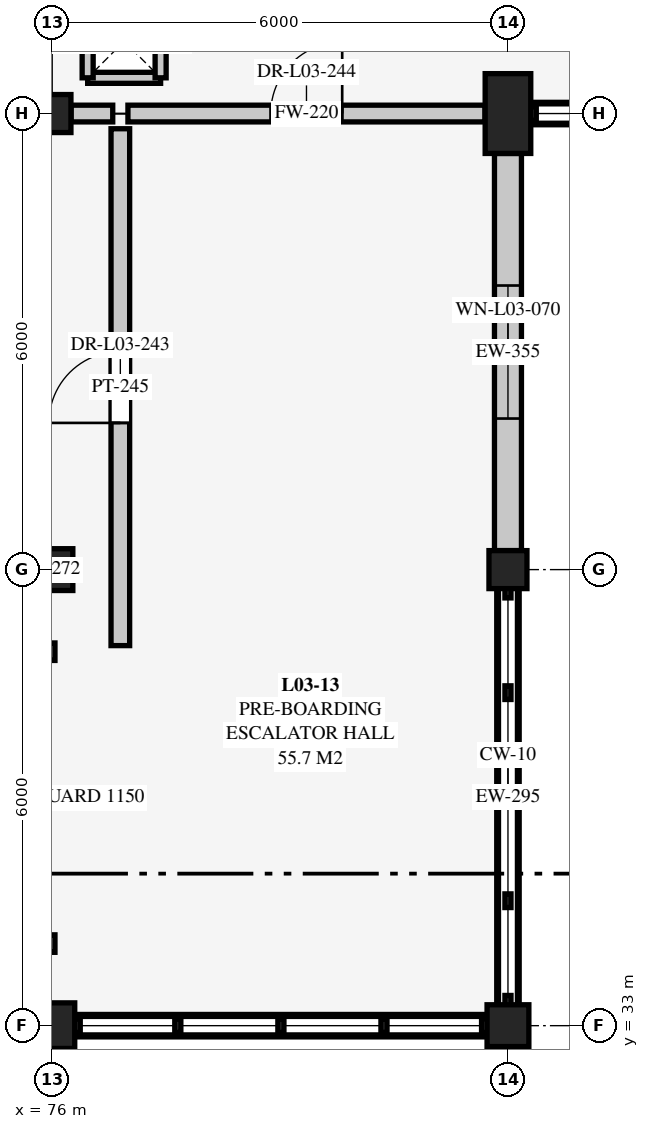
"""IFC4 building model, lengths in metres.
Left out: names, types, materials, properties, quantities, classifications, styles, units other than length and angle.
Written with IfcOpenShell. Run it as: python <this file> out.ifc"""

import sys

from ifc_helpers import new_model, si_unit, direction, frame, frame_2d, origin, origin_2d, place, context, subcontext, project, spatial, rectangle, extrude, element, fill, save


model = new_model("IFC4")
c1 = context("Model", 3, precision=1e-05, world=origin(), true_north=direction((0.0, 1.0)))
c2 = subcontext(c1, "Body", "Model", "MODEL_VIEW")
j1 = project(units=[si_unit("LENGTHUNIT", "METRE"), si_unit("PLANEANGLEUNIT", "RADIAN")], contexts=[c1])
p1 = place(None, origin())
s1 = spatial("IfcSite", under=j1, at=p1, CompositionType="ELEMENT")
p2 = place(p1, origin())
s2 = spatial("IfcBuilding", under=s1, at=p2, CompositionType="ELEMENT")
p3 = place(p2, frame((0.0, 0.0, 9.0)))
s3 = spatial("IfcBuildingStorey", under=s2, at=p3, CompositionType="ELEMENT", Elevation=9.0)
p4 = place(p3, frame((76.0, 33.0, 0.0), z_axis=(0.0, 0.0, 1.0), x_axis=(1.0, 0.0, 0.0)))
e1 = element("IfcColumn", 1, at=p4, inside=s3, PredefinedType="COLUMN", context=c2, shape_type="SweptSolid", body=[
    extrude(rectangle(XDim=0.6, YDim=0.6, at=origin_2d()), origin(), (0.0, 0.0, 1.0), 4.5),
])
p5 = place(p3, frame((76.0, 39.0, 0.0), z_axis=(0.0, 0.0, 1.0), x_axis=(1.0, 0.0, 0.0)))
e2 = element("IfcColumn", 2, at=p5, inside=s3, PredefinedType="COLUMN", context=c2, shape_type="SweptSolid", body=[
    extrude(rectangle(XDim=0.55, YDim=0.55, at=origin_2d()), origin(), (0.0, 0.0, 1.0), 4.5),
])
p6 = place(p3, frame((76.0, 45.0, 0.0), z_axis=(0.0, 0.0, 1.0), x_axis=(1.0, 0.0, 0.0)))
e3 = element("IfcColumn", 3, at=p6, inside=s3, PredefinedType="COLUMN", context=c2, shape_type="SweptSolid", body=[
    extrude(rectangle(XDim=0.5, YDim=0.5, at=origin_2d()), origin(), (0.0, 0.0, 1.0), 4.5),
])
p7 = place(p3, frame((82.0, 33.0, 0.0), z_axis=(0.0, 0.0, 1.0), x_axis=(1.0, 0.0, 0.0)))
e4 = element("IfcColumn", 4, at=p7, inside=s3, PredefinedType="COLUMN", context=c2, shape_type="SweptSolid", body=[
    extrude(rectangle(XDim=0.55, YDim=0.55, at=origin_2d()), origin(), (0.0, 0.0, 1.0), 4.5),
])
p8 = place(p3, frame((82.0, 39.0, 0.0), z_axis=(0.0, 0.0, 1.0), x_axis=(1.0, 0.0, 0.0)))
e5 = element("IfcColumn", 5, at=p8, inside=s3, PredefinedType="COLUMN", context=c2, shape_type="SweptSolid", body=[
    extrude(rectangle(XDim=0.5, YDim=0.5, at=origin_2d()), origin(), (0.0, 0.0, 1.0), 4.5),
])
p9 = place(p3, frame((82.0, 45.0, 0.0), z_axis=(0.0, 0.0, 1.0), x_axis=(1.0, 0.0, 0.0)))
e6 = element("IfcColumn", 6, at=p9, inside=s3, PredefinedType="PILASTER", context=c2, shape_type="SweptSolid", body=[
    extrude(rectangle(XDim=0.6, YDim=1.05, at=origin_2d()), origin(), (0.0, 0.0, 1.0), 4.5),
])
p10 = place(p3, frame((81.725, 33.0, 0.0), z_axis=(0.0, 0.0, 1.0), x_axis=(-1.0, 0.0, 0.0)))
e7 = element("IfcWall", 7, at=p10, inside=s3, PredefinedType="SOLIDWALL", context=c2, shape_type="SweptSolid", body=[
    extrude(rectangle(XDim=5.425, YDim=0.295, at=frame_2d((2.712, 0.0))), origin(), (0.0, 0.0, 1.0), 0.16),
])
p11 = place(p3, frame((82.0, 38.75, 0.0), z_axis=(0.0, 0.0, 1.0), x_axis=(0.0, -1.0, 0.0)))
e8 = element("IfcWall", 8, at=p11, inside=s3, PredefinedType="SOLIDWALL", context=c2, shape_type="SweptSolid", body=[
    extrude(rectangle(XDim=5.475, YDim=0.295, at=frame_2d((2.738, 0.0))), origin(), (0.0, 0.0, 1.0), 0.21),
])
p12 = place(p3, frame((82.0, 44.475, 0.0), z_axis=(0.0, 0.0, 1.0), x_axis=(0.0, -1.0, 0.0)))
e9 = element("IfcWall", 9, at=p12, inside=s3, PredefinedType="SOLIDWALL", context=c2, shape_type="SweptSolid", body=[
    extrude(rectangle(XDim=5.225, YDim=0.355, at=frame_2d((2.613, 0.0))), origin(), (0.0, 0.0, 1.0), 3.809),
])
p13 = place(p12, frame((1.738, 0.0, 1.25)))
e10 = element("IfcOpeningElement", 10, at=p13, cuts=e9, PredefinedType="OPENING", context=c2, shape_type="SweptSolid", body=[
    extrude(rectangle(XDim=1.75, YDim=1.5, at=frame_2d((0.875, 0.75))), frame((0.0, 0.188, 0.0), z_axis=(0.0, -1.0, 0.0), x_axis=(1.0, 0.0, 0.0)), (0.0, 0.0, 1.0), 0.375),
])
p14 = place(p3, frame((87.7, 45.0, 0.0), z_axis=(0.0, 0.0, 1.0), x_axis=(-1.0, 0.0, 0.0)))
e11 = element("IfcWall", 11, at=p14, inside=s3, PredefinedType="SOLIDWALL", context=c2, shape_type="SweptSolid", body=[
    extrude(rectangle(XDim=5.4, YDim=0.295, at=frame_2d((2.7, 0.0))), origin(), (0.0, 0.0, 1.0), 0.26),
])
for number, where, z_axis, x_axis in (
    (12, (76.47, 45.47, 0.0), (0.0, 0.0, 1.0), (1.0, 0.0, 0.0)),
    (13, (77.43, 45.47, 0.0), (0.0, 0.0, 1.0), (0.0, 1.0, 0.0)),
    (14, (76.47, 46.43, 0.0), (0.0, 0.0, 1.0), (0.0, -1.0, 0.0)),
):
    element("IfcWall", number, at=place(p3, frame(where, z_axis=z_axis, x_axis=x_axis)), inside=s3, PredefinedType="PARTITIONING", context=c2, shape_type="SweptSolid", body=[
        extrude(rectangle(XDim=0.96, YDim=0.145, at=frame_2d((0.48, 0.0))), origin(), (0.0, 0.0, 1.0), 4.252),
    ])
for number, where, z_axis, x_axis in (
    (15, (70.8, 34.08, 0.0), (0.0, 0.0, 1.0), (1.0, 0.0, 0.0)),
    (16, (70.8, 37.92, 0.0), (0.0, 0.0, 1.0), (1.0, 0.0, 0.0)),
):
    element("IfcWall", number, at=place(p3, frame(where, z_axis=z_axis, x_axis=x_axis)), inside=s3, PredefinedType="SHEAR", context=c2, shape_type="SweptSolid", body=[
        extrude(rectangle(XDim=5.24, YDim=0.23, at=frame_2d((2.62, 0.0))), origin(), (0.0, 0.0, 1.0), 4.216),
    ])
p15 = place(p3, frame((76.9, 38.0, 0.0), z_axis=(0.0, 0.0, 1.0), x_axis=(0.0, 1.0, 0.0)))
e17 = element("IfcWall", 17, at=p15, inside=s3, PredefinedType="PARTITIONING", context=c2, shape_type="SweptSolid", body=[
    extrude(rectangle(XDim=6.8, YDim=0.245, at=frame_2d((3.4, 0.0))), origin(), (0.0, 0.0, 1.0), 4.216),
])
p16 = place(p15, frame((2.93, 0.0, 0.0)))
e18 = element("IfcOpeningElement", 18, at=p16, cuts=e17, PredefinedType="OPENING", context=c2, shape_type="SweptSolid", body=[
    extrude(rectangle(XDim=0.94, YDim=2.1, at=frame_2d((0.47, 1.05))), frame((0.0, 0.133, 0.0), z_axis=(0.0, -1.0, 0.0), x_axis=(1.0, 0.0, 0.0)), (0.0, 0.0, 1.0), 0.265),
])
p17 = place(p3, frame((77.0, 45.0, 0.0), z_axis=(0.0, 0.0, 1.0), x_axis=(1.0, 0.0, 0.0)))
e19 = element("IfcWall", 19, at=p17, inside=s3, PredefinedType="SOLIDWALL", context=c2, shape_type="SweptSolid", body=[
    extrude(rectangle(XDim=4.698, YDim=0.22, at=frame_2d((2.349, 0.0))), origin(), (0.0, 0.0, 1.0), 3.753),
])
p18 = place(p17, frame((1.879, 0.0, 0.0)))
e20 = element("IfcOpeningElement", 20, at=p18, cuts=e19, PredefinedType="OPENING", context=c2, shape_type="SweptSolid", body=[
    extrude(rectangle(XDim=0.94, YDim=2.1, at=frame_2d((0.47, 1.05))), frame((0.0, 0.12, 0.0), z_axis=(0.0, -1.0, 0.0), x_axis=(1.0, 0.0, 0.0)), (0.0, 0.0, 1.0), 0.24),
])
p19 = place(p3, frame((76.252, 45.0, 0.0), z_axis=(0.0, 0.0, 1.0), x_axis=(1.0, 0.0, 0.0)))
e21 = element("IfcWall", 21, at=p19, inside=s3, PredefinedType="SOLIDWALL", context=c2, shape_type="SweptSolid", body=[
    extrude(rectangle(XDim=0.548, YDim=0.22, at=frame_2d((0.274, 0.0))), origin(), (0.0, 0.0, 1.0), 3.753),
])
p20 = place(p13, origin())
e22 = element("IfcWindow", 22, at=p20, inside=s3, PartitioningType="SINGLE_PANEL", PredefinedType="WINDOW", context=c2, shape_type="SweptSolid", body=[
    extrude(rectangle(XDim=1.75, YDim=1.5, at=frame_2d((0.875, 0.75))), frame((0.0, 0.03, 0.0), z_axis=(0.0, -1.0, 0.0), x_axis=(1.0, 0.0, 0.0)), (0.0, 0.0, 1.0), 0.06),
])
fill(e10, e22)
p21 = place(p16, origin())
e23 = element("IfcDoor", 23, at=p21, inside=s3, OperationType="SINGLE_SWING_LEFT", PredefinedType="DOOR", context=c2, shape_type="SweptSolid", body=[
    extrude(rectangle(XDim=0.94, YDim=2.1, at=frame_2d((0.47, 1.05))), frame((0.0, 0.025, 0.0), z_axis=(0.0, -1.0, 0.0), x_axis=(1.0, 0.0, 0.0)), (0.0, 0.0, 1.0), 0.05),
])
fill(e18, e23)
p22 = place(p18, origin())
e24 = element("IfcDoor", 24, at=p22, inside=s3, OperationType="SINGLE_SWING_RIGHT", PredefinedType="DOOR", context=c2, shape_type="SweptSolid", body=[
    extrude(rectangle(XDim=0.94, YDim=2.1, at=frame_2d((0.47, 1.05))), frame((0.0, 0.025, 0.0), z_axis=(0.0, -1.0, 0.0), x_axis=(1.0, 0.0, 0.0)), (0.0, 0.0, 1.0), 0.05),
])
fill(e20, e24)
save(model, sys.argv[1])
